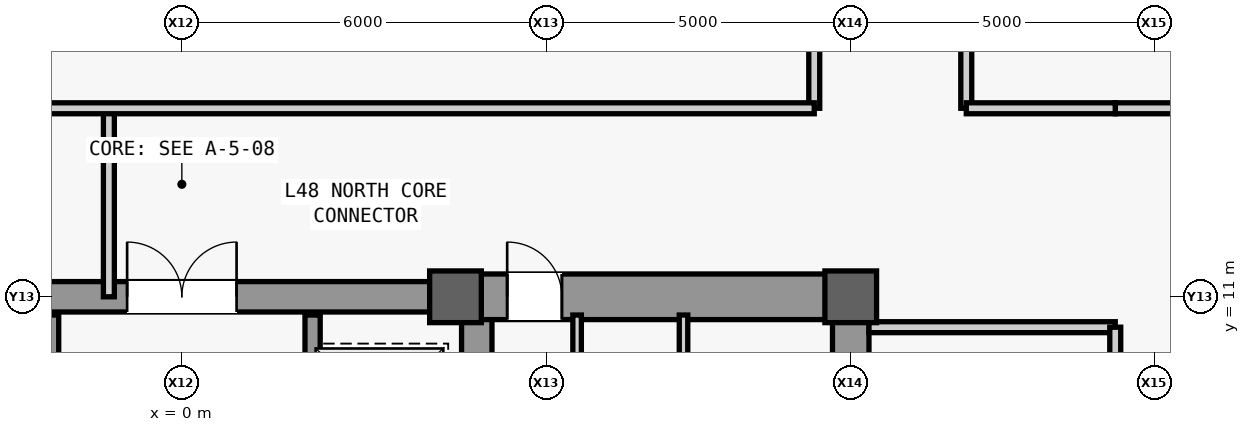
"""IFC4 building model, lengths in metres.
Left out: names, types, materials, properties, quantities, classifications, styles, units other than length and angle.
Written with IfcOpenShell. Run it as: python <this file> out.ifc"""

import sys

from ifc_helpers import new_model, si_unit, direction, frame, frame_2d, origin, origin_2d, place, context, subcontext, project, spatial, rectangle, extrude, source, transform, mapped, element, fill, save


model = new_model("IFC4")
c1 = context("Model", 3, precision=1e-05, world=origin(), true_north=direction((0.0, 1.0)))
c2 = subcontext(c1, "Body", "Model", "MODEL_VIEW")
j1 = project(units=[si_unit("LENGTHUNIT", "METRE"), si_unit("PLANEANGLEUNIT", "RADIAN")], contexts=[c1])
p1 = place(None, origin())
s1 = spatial("IfcSite", under=j1, at=p1, CompositionType="ELEMENT")
p2 = place(p1, origin())
s2 = spatial("IfcBuilding", under=s1, at=p2, CompositionType="ELEMENT")
p3 = place(p2, frame((0.0, 0.0, 207.1)))
s3 = spatial("IfcBuildingStorey", under=s2, at=p3, CompositionType="ELEMENT", Elevation=207.1)
m1 = source(origin(), c2, "Body", "SweptSolid", [
    extrude(rectangle(XDim=22.0, YDim=0.6, at=frame_2d((11.0, 0.0))), origin(), (0.0, 0.0, 1.0), 3.78),
])
p4 = place(p3, frame((11.0, -11.0, 0.0), z_axis=(0.0, 0.0, 1.0), x_axis=(0.0, 1.0, 0.0)))
e1 = element("IfcWall", 1, at=p4, inside=s3, PredefinedType="SHEAR", context=c2, shape_type="MappedRepresentation", body=[
    mapped(m1, transform((0.0, 0.0, 0.0), scale=1.0)),
])
m2 = source(origin(), c2, "Body", "SweptSolid", [
    extrude(rectangle(XDim=1.1, YDim=2.2, at=frame_2d((0.55, 1.1))), frame((0.0, 0.31, 0.0), z_axis=(0.0, -1.0, 0.0), x_axis=(1.0, 0.0, 0.0)), (0.0, 0.0, 1.0), 0.62),
])
p5 = place(p4, frame((0.8, 0.0, 0.0)))
e2 = element("IfcOpeningElement", 2, at=p5, cuts=e1, PredefinedType="OPENING", context=c2, shape_type="MappedRepresentation", body=[
    mapped(m2, transform((0.0, 0.0, 0.0), scale=1.0)),
])
m3 = source(origin(), c2, "Body", "SweptSolid", [
    extrude(rectangle(XDim=0.9, YDim=2.15, at=frame_2d((0.45, 1.075))), frame((0.0, 0.31, 0.0), z_axis=(0.0, -1.0, 0.0), x_axis=(1.0, 0.0, 0.0)), (0.0, 0.0, 1.0), 0.62),
])
p6 = place(p4, frame((7.575, 0.0, 0.0)))
e3 = element("IfcOpeningElement", 3, at=p6, cuts=e1, PredefinedType="OPENING", context=c2, shape_type="MappedRepresentation", body=[
    mapped(m3, transform((0.0, 0.0, 0.0), scale=1.0)),
])
m4 = source(origin(), c2, "Body", "SweptSolid", [
    extrude(rectangle(XDim=1.3, YDim=2.3, at=frame_2d((0.65, 1.15))), frame((0.0, 0.31, 0.0), z_axis=(0.0, -1.0, 0.0), x_axis=(1.0, 0.0, 0.0)), (0.0, 0.0, 1.0), 0.62),
])
p7 = place(p4, frame((2.7, 0.0, 0.0)))
e4 = element("IfcOpeningElement", 4, at=p7, cuts=e1, PredefinedType="OPENING", context=c2, shape_type="MappedRepresentation", body=[
    mapped(m4, transform((0.0, 0.0, 0.0), scale=1.0)),
])
p8 = place(p4, frame((13.35, 0.0, 0.0)))
e5 = element("IfcOpeningElement", 5, at=p8, cuts=e1, PredefinedType="OPENING", context=c2, shape_type="MappedRepresentation", body=[
    mapped(m4, transform((0.0, 0.0, 0.0), scale=1.0)),
])
m5 = source(origin(), c2, "Body", "SweptSolid", [
    extrude(rectangle(XDim=21.4, YDim=0.5, at=frame_2d((10.7, 0.0))), origin(), (0.0, 0.0, 1.0), 3.78),
])
p9 = place(p3, frame((4.85, -10.7, 0.0), z_axis=(0.0, 0.0, 1.0), x_axis=(0.0, 1.0, 0.0)))
e6 = element("IfcWall", 6, at=p9, inside=s3, PredefinedType="SHEAR", context=c2, shape_type="MappedRepresentation", body=[
    mapped(m5, transform((0.0, 0.0, 0.0), scale=1.0)),
])
m6 = source(origin(), c2, "Body", "SweptSolid", [
    extrude(rectangle(XDim=5.85, YDim=0.75, at=frame_2d((2.925, 0.0))), origin(), (0.0, 0.0, 1.0), 3.78),
])
p10 = place(p3, frame((4.85, 11.0, 0.0), z_axis=(0.0, 0.0, 1.0), x_axis=(1.0, 0.0, 0.0)))
e7 = element("IfcWall", 7, at=p10, inside=s3, PredefinedType="SHEAR", context=c2, shape_type="MappedRepresentation", body=[
    mapped(m6, transform((0.0, 0.0, 0.0), scale=1.0)),
])
m7 = source(origin(), c2, "Body", "SweptSolid", [
    extrude(rectangle(XDim=0.9, YDim=2.15, at=frame_2d((0.45, 1.075))), frame((0.0, 0.385, 0.0), z_axis=(0.0, -1.0, 0.0), x_axis=(1.0, 0.0, 0.0)), (0.0, 0.0, 1.0), 0.77),
])
p11 = place(p10, frame((0.5, 0.0, 0.0)))
e8 = element("IfcOpeningElement", 8, at=p11, cuts=e7, PredefinedType="OPENING", context=c2, shape_type="MappedRepresentation", body=[
    mapped(m7, transform((0.0, 0.0, 0.0), scale=1.0)),
])
m8 = source(origin(), c2, "Body", "SweptSolid", [
    extrude(rectangle(XDim=9.2, YDim=0.5, at=frame_2d((4.6, 0.0))), origin(), (0.0, 0.0, 1.0), 3.78),
])
p12 = place(p3, frame((-4.6, 11.0, 0.0), z_axis=(0.0, 0.0, 1.0), x_axis=(1.0, 0.0, 0.0)))
e9 = element("IfcWall", 9, at=p12, inside=s3, PredefinedType="SHEAR", context=c2, shape_type="MappedRepresentation", body=[
    mapped(m8, transform((0.0, 0.0, 0.0), scale=1.0)),
])
m9 = source(origin(), c2, "Body", "SweptSolid", [
    extrude(rectangle(XDim=1.8, YDim=2.25, at=frame_2d((0.9, 1.125))), frame((0.0, 0.26, 0.0), z_axis=(0.0, -1.0, 0.0), x_axis=(1.0, 0.0, 0.0)), (0.0, 0.0, 1.0), 0.52),
])
p13 = place(p12, frame((3.7, 0.0, 0.0)))
e10 = element("IfcOpeningElement", 10, at=p13, cuts=e9, PredefinedType="OPENING", context=c2, shape_type="MappedRepresentation", body=[
    mapped(m9, transform((0.0, 0.0, 0.0), scale=1.0)),
])
m10 = source(origin(), c2, "Body", "SweptSolid", [
    extrude(rectangle(XDim=0.85, YDim=0.85, at=origin_2d()), origin(), (0.0, 0.0, 1.0), 4.0),
])
for number, where, z_axis, x_axis in (
    (11, (4.5, 11.0, 0.0), (0.0, 0.0, 1.0), (1.0, 0.0, 0.0)),
    (12, (11.0, 11.0, 0.0), (0.0, 0.0, 1.0), (1.0, 0.0, 0.0)),
):
    element("IfcColumn", number, at=place(p3, frame(where, z_axis=z_axis, x_axis=x_axis)), inside=s3, PredefinedType="COLUMN", context=c2, shape_type="MappedRepresentation", body=[
        mapped(m10, transform((0.0, 0.0, 0.0), scale=1.0)),
    ])
m11 = source(origin(), c2, "Body", "SweptSolid", [
    extrude(rectangle(XDim=9.4, YDim=0.14, at=frame_2d((4.7, 0.0))), origin(), (0.0, 0.0, 1.0), 3.78),
])
p14 = place(p3, frame((8.25, 1.3, 0.0), z_axis=(0.0, 0.0, 1.0), x_axis=(0.0, 1.0, 0.0)))
e13 = element("IfcWall", 13, at=p14, inside=s3, PredefinedType="PARTITIONING", context=c2, shape_type="MappedRepresentation", body=[
    mapped(m11, transform((0.0, 0.0, 0.0), scale=1.0)),
])
m12 = source(origin(), c2, "Body", "SweptSolid", [
    extrude(rectangle(XDim=5.7, YDim=0.14, at=frame_2d((2.85, 0.0))), origin(), (0.0, 0.0, 1.0), 3.78),
])
p15 = place(p3, frame((6.5, 5.0, 0.0), z_axis=(0.0, 0.0, 1.0), x_axis=(0.0, 1.0, 0.0)))
e14 = element("IfcWall", 14, at=p15, inside=s3, PredefinedType="PARTITIONING", context=c2, shape_type="MappedRepresentation", body=[
    mapped(m12, transform((0.0, 0.0, 0.0), scale=1.0)),
])
m13 = source(origin(), c2, "Body", "SweptSolid", [
    extrude(rectangle(XDim=0.9, YDim=2.15, at=frame_2d((0.45, 1.075))), frame((0.0, 0.08, 0.0), z_axis=(0.0, -1.0, 0.0), x_axis=(1.0, 0.0, 0.0)), (0.0, 0.0, 1.0), 0.16),
])
p16 = place(p15, frame((2.05, 0.0, 0.0)))
e15 = element("IfcOpeningElement", 15, at=p16, cuts=e14, PredefinedType="OPENING", context=c2, shape_type="MappedRepresentation", body=[
    mapped(m13, transform((0.0, 0.0, 0.0), scale=1.0)),
])
m14 = source(origin(), c2, "Body", "SweptSolid", [
    extrude(rectangle(XDim=4.05, YDim=0.18, at=frame_2d((2.025, 0.0))), origin(), (0.0, 0.0, 1.0), 3.78),
])
p17 = place(p3, frame((11.3, 10.5, 0.0), z_axis=(0.0, 0.0, 1.0), x_axis=(1.0, 0.0, 0.0)))
e16 = element("IfcWall", 16, at=p17, inside=s3, PredefinedType="PARTITIONING", context=c2, shape_type="MappedRepresentation", body=[
    mapped(m14, transform((0.0, 0.0, 0.0), scale=1.0)),
])
m15 = source(origin(), c2, "Body", "SweptSolid", [
    extrude(rectangle(XDim=16.6, YDim=0.18, at=frame_2d((8.3, 0.0))), origin(), (0.0, 0.0, 1.0), 3.78),
])
p18 = place(p3, frame((15.35, -6.1, 0.0), z_axis=(0.0, 0.0, 1.0), x_axis=(0.0, 1.0, 0.0)))
e17 = element("IfcWall", 17, at=p18, inside=s3, PredefinedType="PARTITIONING", context=c2, shape_type="MappedRepresentation", body=[
    mapped(m15, transform((0.0, 0.0, 0.0), scale=1.0)),
])
m16 = source(origin(), c2, "Body", "SweptSolid", [
    extrude(rectangle(XDim=1.8, YDim=2.25, at=frame_2d((0.9, 1.125))), frame((0.0, 0.1, 0.0), z_axis=(0.0, -1.0, 0.0), x_axis=(1.0, 0.0, 0.0)), (0.0, 0.0, 1.0), 0.2),
])
p19 = place(p18, frame((2.7, 0.0, 0.0)))
e18 = element("IfcOpeningElement", 18, at=p19, cuts=e17, PredefinedType="OPENING", context=c2, shape_type="MappedRepresentation", body=[
    mapped(m16, transform((0.0, 0.0, 0.0), scale=1.0)),
])
p20 = place(p18, frame((13.0, 0.0, 0.0)))
e19 = element("IfcOpeningElement", 19, at=p20, cuts=e17, PredefinedType="OPENING", context=c2, shape_type="MappedRepresentation", body=[
    mapped(m16, transform((0.0, 0.0, 0.0), scale=1.0)),
])
m17 = source(origin(), c2, "Body", "SweptSolid", [
    extrude(rectangle(XDim=5.4, YDim=0.25, at=frame_2d((2.7, 0.0))), origin(), (0.0, 0.0, 1.0), 3.78),
])
p21 = place(p3, frame((-2.15, 5.3, 0.0), z_axis=(0.0, 0.0, 1.0), x_axis=(0.0, 1.0, 0.0)))
e20 = element("IfcWall", 20, at=p21, inside=s3, PredefinedType="SHEAR", context=c2, shape_type="MappedRepresentation", body=[
    mapped(m17, transform((0.0, 0.0, 0.0), scale=1.0)),
])
m18 = source(origin(), c2, "Body", "SweptSolid", [
    extrude(rectangle(XDim=1.2, YDim=2.3, at=frame_2d((0.6, 1.15))), frame((0.0, 0.135, 0.0), z_axis=(0.0, -1.0, 0.0), x_axis=(1.0, 0.0, 0.0)), (0.0, 0.0, 1.0), 0.27),
])
p22 = place(p21, frame((3.3, 0.0, 0.0)))
e21 = element("IfcOpeningElement", 21, at=p22, cuts=e20, PredefinedType="OPENING", context=c2, shape_type="MappedRepresentation", body=[
    mapped(m18, transform((0.0, 0.0, 0.0), scale=1.0)),
])
p23 = place(p21, frame((0.9, 0.0, 0.0)))
e22 = element("IfcOpeningElement", 22, at=p23, cuts=e20, PredefinedType="OPENING", context=c2, shape_type="MappedRepresentation", body=[
    mapped(m18, transform((0.0, 0.0, 0.0), scale=1.0)),
])
p24 = place(p3, frame((2.15, 5.3, 0.0), z_axis=(0.0, 0.0, 1.0), x_axis=(0.0, 1.0, 0.0)))
e23 = element("IfcWall", 23, at=p24, inside=s3, PredefinedType="SHEAR", context=c2, shape_type="MappedRepresentation", body=[
    mapped(m17, transform((0.0, 0.0, 0.0), scale=1.0)),
])
p25 = place(p24, frame((3.3, 0.0, 0.0)))
e24 = element("IfcOpeningElement", 24, at=p25, cuts=e23, PredefinedType="OPENING", context=c2, shape_type="MappedRepresentation", body=[
    mapped(m18, transform((0.0, 0.0, 0.0), scale=1.0)),
])
p26 = place(p24, frame((0.9, 0.0, 0.0)))
e25 = element("IfcOpeningElement", 25, at=p26, cuts=e23, PredefinedType="OPENING", context=c2, shape_type="MappedRepresentation", body=[
    mapped(m18, transform((0.0, 0.0, 0.0), scale=1.0)),
])
m19 = source(origin(), c2, "Body", "SweptSolid", [
    extrude(rectangle(XDim=2.45, YDim=0.18, at=frame_2d((1.225, 0.0))), origin(), (0.0, 0.0, 1.0), 3.78),
])
p27 = place(p3, frame((15.35, 14.1, 0.0), z_axis=(0.0, 0.0, 1.0), x_axis=(1.0, 0.0, 0.0)))
e26 = element("IfcWall", 26, at=p27, inside=s3, PredefinedType="PARTITIONING", context=c2, shape_type="MappedRepresentation", body=[
    mapped(m19, transform((0.0, 0.0, 0.0), scale=1.0)),
])
m20 = source(origin(), c2, "Body", "SweptSolid", [
    extrude(rectangle(XDim=3.1, YDim=0.18, at=frame_2d((1.55, 0.0))), origin(), (0.0, 0.0, 1.0), 3.78),
])
p28 = place(p3, frame((-1.2, 11.0, 0.0), z_axis=(0.0, 0.0, 1.0), x_axis=(0.0, 1.0, 0.0)))
e27 = element("IfcWall", 27, at=p28, inside=s3, PredefinedType="PARTITIONING", context=c2, shape_type="MappedRepresentation", body=[
    mapped(m20, transform((0.0, 0.0, 0.0), scale=1.0)),
])
m21 = source(origin(), c2, "Body", "SweptSolid", [
    extrude(rectangle(XDim=15.9, YDim=0.18, at=frame_2d((7.95, 0.0))), origin(), (0.0, 0.0, 1.0), 3.78),
])
p29 = place(p3, frame((10.4, 14.1, 0.0), z_axis=(0.0, 0.0, 1.0), x_axis=(0.0, 1.0, 0.0)))
e28 = element("IfcWall", 28, at=p29, inside=s3, PredefinedType="PARTITIONING", context=c2, shape_type="MappedRepresentation", body=[
    mapped(m21, transform((0.0, 0.0, 0.0), scale=1.0)),
])
m22 = source(origin(), c2, "Body", "SweptSolid", [
    extrude(rectangle(XDim=1.05, YDim=2.2, at=frame_2d((0.525, 1.1))), frame((0.0, 0.1, 0.0), z_axis=(0.0, -1.0, 0.0), x_axis=(1.0, 0.0, 0.0)), (0.0, 0.0, 1.0), 0.2),
])
p30 = place(p29, frame((11.4, 0.0, 0.0)))
e29 = element("IfcOpeningElement", 29, at=p30, cuts=e28, PredefinedType="OPENING", context=c2, shape_type="MappedRepresentation", body=[
    mapped(m22, transform((0.0, 0.0, 0.0), scale=1.0)),
])
m23 = source(origin(), c2, "Body", "SweptSolid", [
    extrude(rectangle(XDim=25.75, YDim=0.18, at=frame_2d((12.875, 0.0))), origin(), (0.0, 0.0, 1.0), 3.78),
])
p31 = place(p3, frame((-15.35, 14.1, 0.0), z_axis=(0.0, 0.0, 1.0), x_axis=(1.0, 0.0, 0.0)))
e30 = element("IfcWall", 30, at=p31, inside=s3, PredefinedType="PARTITIONING", context=c2, shape_type="MappedRepresentation", body=[
    mapped(m23, transform((0.0, 0.0, 0.0), scale=1.0)),
])
p32 = place(p3, frame((12.9, 14.1, 0.0), z_axis=(0.0, 0.0, 1.0), x_axis=(0.0, 1.0, 0.0)))
e31 = element("IfcWall", 31, at=p32, inside=s3, PredefinedType="PARTITIONING", context=c2, shape_type="MappedRepresentation", body=[
    mapped(m21, transform((0.0, 0.0, 0.0), scale=1.0)),
])
p33 = place(p32, frame((11.4, 0.0, 0.0)))
e32 = element("IfcOpeningElement", 32, at=p33, cuts=e31, PredefinedType="OPENING", context=c2, shape_type="MappedRepresentation", body=[
    mapped(m22, transform((0.0, 0.0, 0.0), scale=1.0)),
])
m24 = source(origin(), c2, "Body", "SweptSolid", [
    extrude(rectangle(XDim=2.45, YDim=0.18, at=frame_2d((1.225, 0.0))), origin(), (0.0, 0.0, 1.0), 3.78),
])
p34 = place(p3, frame((12.9, 14.1, 0.0), z_axis=(0.0, 0.0, 1.0), x_axis=(1.0, 0.0, 0.0)))
e33 = element("IfcWall", 33, at=p34, inside=s3, PredefinedType="PARTITIONING", context=c2, shape_type="MappedRepresentation", body=[
    mapped(m24, transform((0.0, 0.0, 0.0), scale=1.0)),
])
m25 = source(origin(), c2, "Body", "SweptSolid", [
    extrude(rectangle(XDim=0.9, YDim=2.15, at=frame_2d((0.45, 1.075))), frame((0.0, 0.025, 0.0), z_axis=(0.0, -1.0, 0.0), x_axis=(1.0, 0.0, 0.0)), (0.0, 0.0, 1.0), 0.05),
])
p35 = place(p11, origin())
e34 = element("IfcDoor", 34, at=p35, inside=s3, OperationType="SINGLE_SWING_LEFT", PredefinedType="DOOR", context=c2, shape_type="MappedRepresentation", body=[
    mapped(m25, transform((0.0, 0.0, 0.0), scale=1.0)),
])
fill(e8, e34)
m26 = source(origin(), c2, "Body", "SweptSolid", [
    extrude(rectangle(XDim=1.8, YDim=2.25, at=frame_2d((0.9, 1.125))), frame((0.0, 0.025, 0.0), z_axis=(0.0, -1.0, 0.0), x_axis=(1.0, 0.0, 0.0)), (0.0, 0.0, 1.0), 0.05),
])
p36 = place(p13, origin())
e35 = element("IfcDoor", 35, at=p36, inside=s3, OperationType="SINGLE_SWING_RIGHT", PredefinedType="DOOR", context=c2, shape_type="MappedRepresentation", body=[
    mapped(m26, transform((0.0, 0.0, 0.0), scale=1.0)),
])
fill(e10, e35)
save(model, sys.argv[1])
